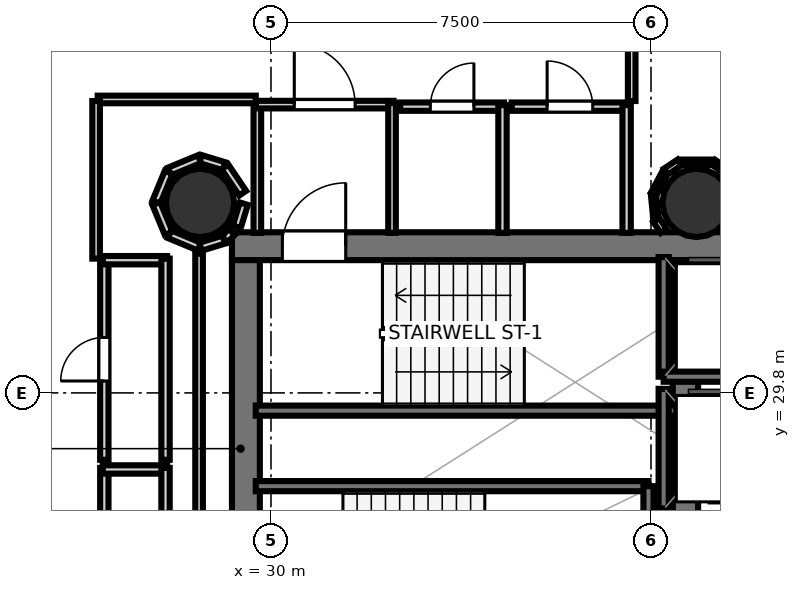
"""IFC4 building model, lengths in metres.
Left out: names, types, materials, properties, quantities, classifications, styles, units other than length and angle.
Written with IfcOpenShell. Run it as: python <this file> out.ifc"""

import sys

from ifc_helpers import new_model, si_unit, direction, frame, frame_2d, origin, origin_2d, place, context, subcontext, project, spatial, rectangle, hollow_circle, extrude, element, fill, save


model = new_model("IFC4")
c1 = context("Model", 3, precision=1e-05, world=origin(), true_north=direction((0.0, 1.0)))
c2 = subcontext(c1, "Body", "Model", "MODEL_VIEW")
j1 = project(units=[si_unit("LENGTHUNIT", "METRE"), si_unit("PLANEANGLEUNIT", "RADIAN")], contexts=[c1])
p1 = place(None, origin())
s1 = spatial("IfcSite", under=j1, at=p1, CompositionType="ELEMENT")
p2 = place(p1, origin())
s2 = spatial("IfcBuilding", under=s1, at=p2, CompositionType="ELEMENT")
p3 = place(p2, frame((0.0, 0.0, 169.8)))
s3 = spatial("IfcBuildingStorey", under=s2, at=p3, CompositionType="ELEMENT", Elevation=169.8)
p4 = place(p3, frame((29.23, 32.695, 0.0), z_axis=(0.0, 0.0, 1.0), x_axis=(1.0, 0.0, 0.0)))
e1 = element("IfcWall", 1, at=p4, inside=s3, PredefinedType="SHEAR", context=c2, shape_type="SweptSolid", body=[
    extrude(rectangle(XDim=10.62, YDim=0.55, at=frame_2d((5.31, 0.0))), origin(), (0.0, 0.0, 1.0), 3.52),
])
p5 = place(p4, frame((0.995, 0.0, 0.0)))
e2 = element("IfcOpeningElement", 2, at=p5, cuts=e1, PredefinedType="OPENING", context=c2, shape_type="SweptSolid", body=[
    extrude(rectangle(XDim=1.25, YDim=2.15, at=frame_2d((0.625, 1.075))), frame((0.0, 0.285, 0.0), z_axis=(0.0, -1.0, 0.0), x_axis=(1.0, 0.0, 0.0)), (0.0, 0.0, 1.0), 0.57),
])
p6 = place(p3, frame((29.505, 24.98, 0.0), z_axis=(0.0, 0.0, 1.0), x_axis=(0.0, 1.0, 0.0)))
e3 = element("IfcWall", 3, at=p6, inside=s3, PredefinedType="SHEAR", context=c2, shape_type="SweptSolid", body=[
    extrude(rectangle(XDim=7.44, YDim=0.55, at=frame_2d((3.72, 0.0))), origin(), (0.0, 0.0, 1.0), 3.52),
])
p7 = place(p3, frame((38.18, 24.98, 0.0), z_axis=(0.0, 0.0, 1.0), x_axis=(0.0, 1.0, 0.0)))
e4 = element("IfcWall", 4, at=p7, inside=s3, PredefinedType="SHEAR", context=c2, shape_type="SweptSolid", body=[
    extrude(rectangle(XDim=7.44, YDim=0.5, at=frame_2d((3.72, 0.0))), origin(), (0.0, 0.0, 1.0), 3.52),
])
for number, where, z_axis, x_axis in (
    (5, (28.6, 33.55, 0.0), (0.0, 0.0, 1.0), (1.0, 0.0, 0.0)),
    (6, (38.4, 33.55, 0.0), (0.0, 0.0, 1.0), (1.0, 0.0, 0.0)),
):
    element("IfcColumn", number, at=place(p3, frame(where, z_axis=z_axis, x_axis=x_axis)), inside=s3, PredefinedType="COLUMN", context=c2, shape_type="SweptSolid", body=[
        extrude(hollow_circle(Radius=0.675, WallThickness=0.032, at=origin_2d()), origin(), (0.0, 0.0, 1.0), 3.7),
    ])
p8 = place(p3, frame((29.7, 29.45, 0.0), z_axis=(0.0, 0.0, 1.0), x_axis=(1.0, 0.0, 0.0)))
e7 = element("IfcWall", 7, at=p8, inside=s3, PredefinedType="SOLIDWALL", context=c2, shape_type="SweptSolid", body=[
    extrude(rectangle(XDim=8.3, YDim=0.2, at=frame_2d((4.15, 0.0))), origin(), (0.0, 0.0, 1.0), 3.52),
])
p9 = place(p3, frame((29.7, 27.96, 0.0), z_axis=(0.0, 0.0, 1.0), x_axis=(1.0, 0.0, 0.0)))
e8 = element("IfcWall", 8, at=p9, inside=s3, PredefinedType="SOLIDWALL", context=c2, shape_type="SweptSolid", body=[
    extrude(rectangle(XDim=7.75, YDim=0.2, at=frame_2d((3.875, 0.0))), origin(), (0.0, 0.0, 1.0), 3.52),
])
p10 = place(p3, frame((37.45, 24.9, 0.0), z_axis=(0.0, 0.0, 1.0), x_axis=(0.0, 1.0, 0.0)))
e9 = element("IfcWall", 9, at=p10, inside=s3, PredefinedType="SOLIDWALL", context=c2, shape_type="SweptSolid", body=[
    extrude(rectangle(XDim=3.06, YDim=0.2, at=frame_2d((1.53, 0.0))), origin(), (0.0, 0.0, 1.0), 3.52),
])
p11 = place(p3, frame((37.75, 30.12, 0.0), z_axis=(0.0, 0.0, 1.0), x_axis=(0.0, 1.0, 0.0)))
e10 = element("IfcWall", 10, at=p11, inside=s3, PredefinedType="SOLIDWALL", context=c2, shape_type="SweptSolid", body=[
    extrude(rectangle(XDim=2.36, YDim=0.2, at=frame_2d((1.18, 0.0))), origin(), (0.0, 0.0, 1.0), 3.52),
])
p12 = place(p3, frame((37.75, 30.12, 0.0), z_axis=(0.0, 0.0, 1.0), x_axis=(1.0, 0.0, 0.0)))
e11 = element("IfcWall", 11, at=p12, inside=s3, PredefinedType="SOLIDWALL", context=c2, shape_type="SweptSolid", body=[
    extrude(rectangle(XDim=2.1, YDim=0.2, at=frame_2d((1.05, 0.0))), origin(), (0.0, 0.0, 1.0), 3.52),
])
p13 = place(p3, frame((37.75, 27.52, 0.0), z_axis=(0.0, 0.0, 1.0), x_axis=(0.0, 1.0, 0.0)))
e12 = element("IfcWall", 12, at=p13, inside=s3, PredefinedType="SOLIDWALL", context=c2, shape_type="SweptSolid", body=[
    extrude(rectangle(XDim=2.36, YDim=0.2, at=frame_2d((1.18, 0.0))), origin(), (0.0, 0.0, 1.0), 3.52),
])
p14 = place(p3, frame((29.731, 32.958, 0.0), z_axis=(0.0, 0.0, 1.0), x_axis=(0.0, 1.0, 0.0)))
e13 = element("IfcWall", 13, at=p14, inside=s3, PredefinedType="PARTITIONING", context=c2, shape_type="SweptSolid", body=[
    extrude(rectangle(XDim=2.562, YDim=0.15, at=frame_2d((1.281, 0.0))), origin(), (0.0, 0.0, 1.0), 2.84),
])
p15 = place(p3, frame((29.7, 35.489, 0.0), z_axis=(0.0, 0.0, 1.0), x_axis=(1.0, 0.0, 0.0)))
e14 = element("IfcWall", 14, at=p15, inside=s3, PredefinedType="PARTITIONING", context=c2, shape_type="SweptSolid", body=[
    extrude(rectangle(XDim=2.72, YDim=0.15, at=frame_2d((1.36, 0.0))), origin(), (0.0, 0.0, 1.0), 2.84),
])
p16 = place(p15, frame((0.76, 0.0, 0.0)))
e15 = element("IfcOpeningElement", 15, at=p16, cuts=e14, PredefinedType="OPENING", context=c2, shape_type="SweptSolid", body=[
    extrude(rectangle(XDim=1.2, YDim=2.15, at=frame_2d((0.6, 1.075))), frame((0.0, 0.085, 0.0), z_axis=(0.0, -1.0, 0.0), x_axis=(1.0, 0.0, 0.0)), (0.0, 0.0, 1.0), 0.17),
])
p17 = place(p3, frame((32.389, 35.52, 0.0), z_axis=(0.0, 0.0, 1.0), x_axis=(0.0, -1.0, 0.0)))
e16 = element("IfcWall", 16, at=p17, inside=s3, PredefinedType="PARTITIONING", context=c2, shape_type="SweptSolid", body=[
    extrude(rectangle(XDim=2.562, YDim=0.15, at=frame_2d((1.281, 0.0))), origin(), (0.0, 0.0, 1.0), 2.84),
])
p18 = place(p3, frame((32.55, 35.449, 0.0), z_axis=(0.0, 0.0, 1.0), x_axis=(1.0, 0.0, 0.0)))
e17 = element("IfcWall", 17, at=p18, inside=s3, PredefinedType="PLUMBINGWALL", context=c2, shape_type="SweptSolid", body=[
    extrude(rectangle(XDim=2.05, YDim=0.165, at=frame_2d((1.025, 0.0))), origin(), (0.0, 0.0, 1.0), 2.84),
])
p19 = place(p18, frame((0.595, 0.0, 0.0)))
e18 = element("IfcOpeningElement", 18, at=p19, cuts=e17, PredefinedType="OPENING", context=c2, shape_type="SweptSolid", body=[
    extrude(rectangle(XDim=0.86, YDim=2.05, at=frame_2d((0.43, 1.025))), frame((0.0, 0.093, 0.0), z_axis=(0.0, -1.0, 0.0), x_axis=(1.0, 0.0, 0.0)), (0.0, 0.0, 1.0), 0.185),
])
p20 = place(p3, frame((34.569, 35.48, 0.0), z_axis=(0.0, 0.0, 1.0), x_axis=(0.0, -1.0, 0.0)))
e19 = element("IfcWall", 19, at=p20, inside=s3, PredefinedType="PLUMBINGWALL", context=c2, shape_type="SweptSolid", body=[
    extrude(rectangle(XDim=2.522, YDim=0.165, at=frame_2d((1.261, 0.0))), origin(), (0.0, 0.0, 1.0), 2.84),
])
p21 = place(p3, frame((34.75, 35.449, 0.0), z_axis=(0.0, 0.0, 1.0), x_axis=(1.0, 0.0, 0.0)))
e20 = element("IfcWall", 20, at=p21, inside=s3, PredefinedType="PLUMBINGWALL", context=c2, shape_type="SweptSolid", body=[
    extrude(rectangle(XDim=2.3, YDim=0.165, at=frame_2d((1.15, 0.0))), origin(), (0.0, 0.0, 1.0), 2.84),
])
p22 = place(p21, frame((0.7, 0.0, 0.0)))
e21 = element("IfcOpeningElement", 21, at=p22, cuts=e20, PredefinedType="OPENING", context=c2, shape_type="SweptSolid", body=[
    extrude(rectangle(XDim=0.9, YDim=2.1, at=frame_2d((0.45, 1.05))), frame((0.0, 0.093, 0.0), z_axis=(0.0, -1.0, 0.0), x_axis=(1.0, 0.0, 0.0)), (0.0, 0.0, 1.0), 0.185),
])
p23 = place(p3, frame((37.019, 35.48, 0.0), z_axis=(0.0, 0.0, 1.0), x_axis=(0.0, -1.0, 0.0)))
e22 = element("IfcWall", 22, at=p23, inside=s3, PredefinedType="PLUMBINGWALL", context=c2, shape_type="SweptSolid", body=[
    extrude(rectangle(XDim=2.522, YDim=0.165, at=frame_2d((1.261, 0.0))), origin(), (0.0, 0.0, 1.0), 2.84),
])
p24 = place(p3, frame((26.711, 25.0, 0.0), z_axis=(0.0, 0.0, 1.0), x_axis=(0.0, 1.0, 0.0)))
e23 = element("IfcWall", 23, at=p24, inside=s3, PredefinedType="PLUMBINGWALL", context=c2, shape_type="SweptSolid", body=[
    extrude(rectangle(XDim=3.32, YDim=0.165, at=frame_2d((1.66, 0.0))), origin(), (0.0, 0.0, 1.0), 2.84),
])
p25 = place(p24, frame((1.21, 0.0, 0.0)))
e24 = element("IfcOpeningElement", 24, at=p25, cuts=e23, PredefinedType="OPENING", context=c2, shape_type="SweptSolid", body=[
    extrude(rectangle(XDim=0.9, YDim=2.1, at=frame_2d((0.45, 1.05))), frame((0.0, 0.093, 0.0), z_axis=(0.0, -1.0, 0.0), x_axis=(1.0, 0.0, 0.0)), (0.0, 0.0, 1.0), 0.185),
])
p26 = place(p3, frame((26.68, 28.289, 0.0), z_axis=(0.0, 0.0, 1.0), x_axis=(1.0, 0.0, 0.0)))
e25 = element("IfcWall", 25, at=p26, inside=s3, PredefinedType="PLUMBINGWALL", context=c2, shape_type="SweptSolid", body=[
    extrude(rectangle(XDim=1.27, YDim=0.165, at=frame_2d((0.635, 0.0))), origin(), (0.0, 0.0, 1.0), 2.84),
])
p27 = place(p3, frame((27.919, 28.32, 0.0), z_axis=(0.0, 0.0, 1.0), x_axis=(0.0, -1.0, 0.0)))
e26 = element("IfcWall", 26, at=p27, inside=s3, PredefinedType="PLUMBINGWALL", context=c2, shape_type="SweptSolid", body=[
    extrude(rectangle(XDim=3.32, YDim=0.165, at=frame_2d((1.66, 0.0))), origin(), (0.0, 0.0, 1.0), 2.84),
])
p28 = place(p3, frame((26.711, 28.48, 0.0), z_axis=(0.0, 0.0, 1.0), x_axis=(0.0, 1.0, 0.0)))
e27 = element("IfcWall", 27, at=p28, inside=s3, PredefinedType="PLUMBINGWALL", context=c2, shape_type="SweptSolid", body=[
    extrude(rectangle(XDim=3.97, YDim=0.165, at=frame_2d((1.985, 0.0))), origin(), (0.0, 0.0, 1.0), 2.84),
])
p29 = place(p28, frame((1.555, 0.0, 0.0)))
e28 = element("IfcOpeningElement", 28, at=p29, cuts=e27, PredefinedType="OPENING", context=c2, shape_type="SweptSolid", body=[
    extrude(rectangle(XDim=0.86, YDim=2.05, at=frame_2d((0.43, 1.025))), frame((0.0, 0.093, 0.0), z_axis=(0.0, -1.0, 0.0), x_axis=(1.0, 0.0, 0.0)), (0.0, 0.0, 1.0), 0.185),
])
p30 = place(p3, frame((26.68, 32.419, 0.0), z_axis=(0.0, 0.0, 1.0), x_axis=(1.0, 0.0, 0.0)))
e29 = element("IfcWall", 29, at=p30, inside=s3, PredefinedType="PLUMBINGWALL", context=c2, shape_type="SweptSolid", body=[
    extrude(rectangle(XDim=1.27, YDim=0.165, at=frame_2d((0.635, 0.0))), origin(), (0.0, 0.0, 1.0), 2.84),
])
p31 = place(p3, frame((27.919, 32.45, 0.0), z_axis=(0.0, 0.0, 1.0), x_axis=(0.0, -1.0, 0.0)))
e30 = element("IfcWall", 30, at=p31, inside=s3, PredefinedType="PLUMBINGWALL", context=c2, shape_type="SweptSolid", body=[
    extrude(rectangle(XDim=3.97, YDim=0.165, at=frame_2d((1.985, 0.0))), origin(), (0.0, 0.0, 1.0), 2.84),
])
p32 = place(p3, frame((28.581, 24.68, 0.0), z_axis=(0.0, 0.0, 1.0), x_axis=(0.0, 1.0, 0.0)))
e31 = element("IfcWall", 31, at=p32, inside=s3, PredefinedType="PARTITIONING", context=c2, shape_type="SweptSolid", body=[
    extrude(rectangle(XDim=7.87, YDim=0.15, at=frame_2d((3.935, 0.0))), origin(), (0.0, 0.0, 1.0), 2.84),
])
p33 = place(p3, frame((37.119, 38.922, 0.0), z_axis=(0.0, 0.0, 1.0), x_axis=(0.0, -1.0, 0.0)))
e32 = element("IfcWall", 32, at=p33, inside=s3, PredefinedType="PARTITIONING", context=c2, shape_type="SweptSolid", body=[
    extrude(rectangle(XDim=3.362, YDim=0.15, at=frame_2d((1.681, 0.0))), origin(), (0.0, 0.0, 1.0), 2.84),
])
p34 = place(p3, frame((29.7, 35.591, 0.0), z_axis=(0.0, 0.0, 1.0), x_axis=(-1.0, 0.0, 0.0)))
e33 = element("IfcWall", 33, at=p34, inside=s3, PredefinedType="PARTITIONING", context=c2, shape_type="SweptSolid", body=[
    extrude(rectangle(XDim=3.12, YDim=0.15, at=frame_2d((1.56, 0.0))), origin(), (0.0, 0.0, 1.0), 2.84),
])
p35 = place(p3, frame((26.549, 35.56, 0.0), z_axis=(0.0, 0.0, 1.0), x_axis=(0.0, -1.0, 0.0)))
e34 = element("IfcWall", 34, at=p35, inside=s3, PredefinedType="PARTITIONING", context=c2, shape_type="SweptSolid", body=[
    extrude(rectangle(XDim=3.11, YDim=0.15, at=frame_2d((1.555, 0.0))), origin(), (0.0, 0.0, 1.0), 2.84),
])
p36 = place(p3, frame((39.008, 34.166, 0.0), z_axis=(0.0, 0.0, 1.0), x_axis=(-0.83170430964, 0.555218822922, 0.0)))
e35 = element("IfcWall", 35, at=p36, inside=s3, PredefinedType="PARTITIONING", context=c2, shape_type="SweptSolid", body=[
    extrude(rectangle(XDim=0.326, YDim=0.12, at=frame_2d((0.163, 0.0))), origin(), (0.0, 0.0, 1.0), 2.84),
])
p37 = place(p3, frame((38.719, 34.352, 0.0), z_axis=(0.0, 0.0, 1.0), x_axis=(-1.0, 0.0, 0.0)))
e36 = element("IfcWall", 36, at=p37, inside=s3, PredefinedType="PARTITIONING", context=c2, shape_type="SweptSolid", body=[
    extrude(rectangle(XDim=0.639, YDim=0.105, at=frame_2d((0.319, 0.0))), origin(), (0.0, 0.0, 1.0), 2.84),
])
p38 = place(p3, frame((38.063, 34.347, 0.0), z_axis=(0.0, 0.0, 1.0), x_axis=(-0.83170430964, -0.555218822922, 0.0)))
e37 = element("IfcWall", 37, at=p38, inside=s3, PredefinedType="PARTITIONING", context=c2, shape_type="SweptSolid", body=[
    extrude(rectangle(XDim=0.326, YDim=0.14, at=frame_2d((0.163, 0.0))), origin(), (0.0, 0.0, 1.0), 2.84),
])
p39 = place(p3, frame((37.782, 34.155, 0.0), z_axis=(0.0, 0.0, 1.0), x_axis=(-0.471424550379, -0.88190639713, 0.0)))
e38 = element("IfcWall", 38, at=p39, inside=s3, PredefinedType="PARTITIONING", context=c2, shape_type="SweptSolid", body=[
    extrude(rectangle(XDim=0.485, YDim=0.12, at=frame_2d((0.242, 0.0))), origin(), (0.0, 0.0, 1.0), 2.84),
])
p40 = place(p3, frame((37.55, 33.71, 0.0), z_axis=(0.0, 0.0, 1.0), x_axis=(0.097659413047, -0.995219894819, 0.0)))
e39 = element("IfcWall", 39, at=p40, inside=s3, PredefinedType="PARTITIONING", context=c2, shape_type="SweptSolid", body=[
    extrude(rectangle(XDim=0.485, YDim=0.105, at=frame_2d((0.242, 0.0))), origin(), (0.0, 0.0, 1.0), 2.84),
])
p41 = place(p3, frame((37.603, 33.213, 0.0), z_axis=(0.0, 0.0, 1.0), x_axis=(0.555554602959, -0.831480055762, 0.0)))
e40 = element("IfcWall", 40, at=p41, inside=s3, PredefinedType="PARTITIONING", context=c2, shape_type="SweptSolid", body=[
    extrude(rectangle(XDim=0.264, YDim=0.14, at=frame_2d((0.132, 0.0))), origin(), (0.0, 0.0, 1.0), 2.84),
])
p42 = place(p3, frame((29.441, 33.741, 0.0), z_axis=(0.0, 0.0, 1.0), x_axis=(-0.559619584068, 0.828749613048, 0.0)))
e41 = element("IfcWall", 41, at=p42, inside=s3, PredefinedType="PLUMBINGWALL", context=c2, shape_type="SweptSolid", body=[
    extrude(rectangle(XDim=0.629, YDim=0.165, at=frame_2d((0.314, 0.0))), origin(), (0.0, 0.0, 1.0), 2.84),
])
p43 = place(p3, frame((29.073, 34.274, 0.0), z_axis=(0.0, 0.0, 1.0), x_axis=(-0.956893067978, 0.290440452511, 0.0)))
e42 = element("IfcWall", 42, at=p43, inside=s3, PredefinedType="PLUMBINGWALL", context=c2, shape_type="SweptSolid", body=[
    extrude(rectangle(XDim=0.485, YDim=0.165, at=frame_2d((0.243, 0.0))), origin(), (0.0, 0.0, 1.0), 2.84),
])
for number, where, z_axis, x_axis in (
    (43, (28.588, 34.414, 0.0), (0.0, 0.0, 1.0), (-0.924, -0.382, 0.0)),
    (44, (27.981, 34.152, 0.0), (0.0, 0.0, 1.0), (-0.383, -0.924, 0.0)),
    (45, (27.736, 33.538, 0.0), (0.0, 0.0, 1.0), (0.383, -0.924, 0.0)),
    (46, (27.998, 32.931, 0.0), (0.0, 0.0, 1.0), (0.924, -0.383, 0.0)),
):
    element("IfcWall", number, at=place(p3, frame(where, z_axis=z_axis, x_axis=x_axis)), inside=s3, PredefinedType="PLUMBINGWALL", context=c2, shape_type="SweptSolid", body=[
        extrude(rectangle(XDim=0.639, YDim=0.165, at=frame_2d((0.319, 0.0))), origin(), (0.0, 0.0, 1.0), 2.84),
    ])
p44 = place(p3, frame((28.609, 32.685, 0.0), z_axis=(0.0, 0.0, 1.0), x_axis=(0.956893067978, 0.290440452511, 0.0)))
e47 = element("IfcWall", 47, at=p44, inside=s3, PredefinedType="PLUMBINGWALL", context=c2, shape_type="SweptSolid", body=[
    extrude(rectangle(XDim=0.485, YDim=0.165, at=frame_2d((0.243, 0.0))), origin(), (0.0, 0.0, 1.0), 2.84),
])
p45 = place(p3, frame((29.086, 32.834, 0.0), z_axis=(0.0, 0.0, 1.0), x_axis=(0.707106781187, 0.707106781187, 0.0)))
e48 = element("IfcWall", 48, at=p45, inside=s3, PredefinedType="PLUMBINGWALL", context=c2, shape_type="SweptSolid", body=[
    extrude(rectangle(XDim=0.204, YDim=0.165, at=frame_2d((0.102, 0.0))), origin(), (0.0, 0.0, 1.0), 2.84),
])
p46 = place(p3, frame((29.324, 33.077, 0.0), z_axis=(0.0, 0.0, 1.0), x_axis=(0.292866596221, 0.956153312402, 0.0)))
e49 = element("IfcWall", 49, at=p46, inside=s3, PredefinedType="PLUMBINGWALL", context=c2, shape_type="SweptSolid", body=[
    extrude(rectangle(XDim=0.479, YDim=0.165, at=frame_2d((0.239, 0.0))), origin(), (0.0, 0.0, 1.0), 2.84),
])
p47 = place(p5, origin())
e50 = element("IfcDoor", 50, at=p47, inside=s3, OperationType="SINGLE_SWING_RIGHT", PredefinedType="DOOR", context=c2, shape_type="SweptSolid", body=[
    extrude(rectangle(XDim=1.25, YDim=2.15, at=frame_2d((0.625, 1.075))), frame((0.0, 0.025, 0.0), z_axis=(0.0, -1.0, 0.0), x_axis=(1.0, 0.0, 0.0)), (0.0, 0.0, 1.0), 0.05),
])
fill(e2, e50)
p48 = place(p16, origin())
e51 = element("IfcDoor", 51, at=p48, inside=s3, OperationType="SINGLE_SWING_LEFT", PredefinedType="DOOR", context=c2, shape_type="SweptSolid", body=[
    extrude(rectangle(XDim=1.2, YDim=2.15, at=frame_2d((0.6, 1.075))), frame((0.0, 0.025, 0.0), z_axis=(0.0, -1.0, 0.0), x_axis=(1.0, 0.0, 0.0)), (0.0, 0.0, 1.0), 0.05),
])
fill(e15, e51)
p49 = place(p19, origin())
e52 = element("IfcDoor", 52, at=p49, inside=s3, OperationType="SINGLE_SWING_RIGHT", PredefinedType="DOOR", context=c2, shape_type="SweptSolid", body=[
    extrude(rectangle(XDim=0.86, YDim=2.05, at=frame_2d((0.43, 1.025))), frame((0.0, 0.025, 0.0), z_axis=(0.0, -1.0, 0.0), x_axis=(1.0, 0.0, 0.0)), (0.0, 0.0, 1.0), 0.05),
])
fill(e18, e52)
p50 = place(p22, origin())
e53 = element("IfcDoor", 53, at=p50, inside=s3, OperationType="SINGLE_SWING_LEFT", PredefinedType="DOOR", context=c2, shape_type="SweptSolid", body=[
    extrude(rectangle(XDim=0.9, YDim=2.1, at=frame_2d((0.45, 1.05))), frame((0.0, 0.025, 0.0), z_axis=(0.0, -1.0, 0.0), x_axis=(1.0, 0.0, 0.0)), (0.0, 0.0, 1.0), 0.05),
])
fill(e21, e53)
p51 = place(p29, origin())
e54 = element("IfcDoor", 54, at=p51, inside=s3, OperationType="SINGLE_SWING_LEFT", PredefinedType="DOOR", context=c2, shape_type="SweptSolid", body=[
    extrude(rectangle(XDim=0.86, YDim=2.05, at=frame_2d((0.43, 1.025))), frame((0.0, 0.025, 0.0), z_axis=(0.0, -1.0, 0.0), x_axis=(1.0, 0.0, 0.0)), (0.0, 0.0, 1.0), 0.05),
])
fill(e28, e54)
save(model, sys.argv[1])
